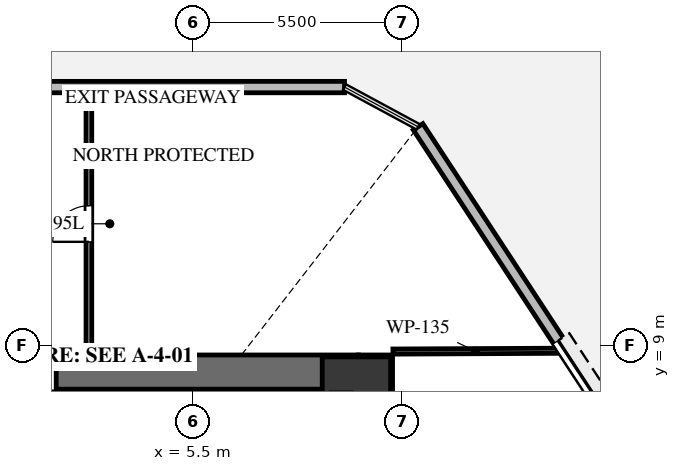
"""IFC4 building model, lengths in metres.
Left out: names, types, materials, properties, quantities, classifications, styles, units other than length and angle.
Written with IfcOpenShell. Run it as: python <this file> out.ifc"""

import sys

from ifc_helpers import new_model, si_unit, direction, frame, frame_2d, origin, origin_2d, place, context, subcontext, project, spatial, rectangle, extrude, source, transform, mapped, element, fill, save


model = new_model("IFC4")
c1 = context("Model", 3, precision=1e-05, world=origin(), true_north=direction((0.0, 1.0)))
c2 = subcontext(c1, "Body", "Model", "MODEL_VIEW")
j1 = project(units=[si_unit("LENGTHUNIT", "METRE"), si_unit("PLANEANGLEUNIT", "RADIAN")], contexts=[c1])
p1 = place(None, origin())
s1 = spatial("IfcSite", under=j1, at=p1, CompositionType="ELEMENT")
p2 = place(p1, origin())
s2 = spatial("IfcBuilding", under=s1, at=p2, CompositionType="ELEMENT")
p3 = place(p2, origin())
s3 = spatial("IfcBuildingStorey", under=s2, at=p3, CompositionType="ELEMENT", Elevation=0.0)
p4 = place(p3, frame((10.3, -0.15, 0.0), z_axis=(0.0, 0.0, 1.0), x_axis=(0.0, 1.0, 0.0)))
e1 = element("IfcWall", 1, at=p4, inside=s3, PredefinedType="SHEAR", context=c2, shape_type="SweptSolid", body=[
    extrude(rectangle(XDim=8.9, YDim=0.9, at=frame_2d((4.45, 0.0))), origin(), (0.0, 0.0, 1.0), 5.2),
])
p5 = place(p3, frame((1.9, 8.3, 0.0), z_axis=(0.0, 0.0, 1.0), x_axis=(1.0, 0.0, 0.0)))
e2 = element("IfcWall", 2, at=p5, inside=s3, PredefinedType="SHEAR", context=c2, shape_type="SweptSolid", body=[
    extrude(rectangle(XDim=7.95, YDim=0.9, at=frame_2d((3.975, 0.0))), origin(), (0.0, 0.0, 1.0), 5.2),
])
m1 = source(origin(), c2, "Body", "SweptSolid", [
    extrude(rectangle(XDim=1.8, YDim=1.8, at=origin_2d()), origin(), (0.0, 0.0, 1.0), 5.2),
])
p6 = place(p3, frame((9.8, 7.8, -0.3), z_axis=(0.0, 0.0, 1.0), x_axis=(1.0, 0.0, 0.0)))
e3 = element("IfcColumn", 3, at=p6, inside=s3, PredefinedType="COLUMN", context=c2, shape_type="MappedRepresentation", body=[
    mapped(m1, transform((0.0, 0.0, 0.0), x_axis=(1.0, 0.0, 0.0), y_axis=(0.0, 1.0, 0.0), z_axis=(0.0, 0.0, 1.0), scale=1.0)),
])
p7 = place(p3, frame((-8.579, 15.8, 0.0), z_axis=(0.0, 0.0, 1.0), x_axis=(1.0, 0.0, 0.0)))
e4 = element("IfcWall", 4, at=p7, inside=s3, PredefinedType="SOLIDWALL", context=c2, shape_type="SweptSolid", body=[
    extrude(rectangle(XDim=18.065, YDim=0.3, at=frame_2d((9.033, 0.0))), origin(), (0.0, 0.0, 1.0), 4.9),
])
p8 = place(p7, frame((8.033, 0.0, 0.0)))
e5 = element("IfcOpeningElement", 5, at=p8, cuts=e4, PredefinedType="OPENING", context=c2, shape_type="SweptSolid", body=[
    extrude(rectangle(XDim=2.0, YDim=2.3, at=frame_2d((1.0, 1.15))), frame((0.0, 0.16, 0.0), z_axis=(0.0, -1.0, 0.0), x_axis=(1.0, 0.0, 0.0)), (0.0, 0.0, 1.0), 0.32),
])
p9 = place(p3, frame((11.422, 14.754, 0.0), z_axis=(0.0, 0.0, 1.0), x_axis=(0.548298501614, -0.836282699288, 0.0)))
e6 = element("IfcWall", 6, at=p9, inside=s3, PredefinedType="SOLIDWALL", context=c2, shape_type="SweptSolid", body=[
    extrude(rectangle(XDim=16.853, YDim=0.3, at=frame_2d((8.426, 0.0))), origin(), (0.0, 0.0, 1.0), 4.9),
])
p10 = place(p9, frame((6.726, 0.0, 0.0)))
e7 = element("IfcOpeningElement", 7, at=p10, cuts=e6, PredefinedType="OPENING", context=c2, shape_type="SweptSolid", body=[
    extrude(rectangle(XDim=3.4, YDim=4.2, at=frame_2d((1.7, 2.1))), frame((0.0, 0.16, 0.0), z_axis=(0.0, -1.0, 0.0), x_axis=(1.0, 0.0, 0.0)), (0.0, 0.0, 1.0), 0.32),
])
p11 = place(p3, frame((2.76, 8.76, 0.0), z_axis=(0.0, 0.0, 1.0), x_axis=(0.0, 1.0, 0.0)))
e8 = element("IfcWall", 8, at=p11, inside=s3, PredefinedType="PARTITIONING", context=c2, shape_type="SweptSolid", body=[
    extrude(rectangle(XDim=6.885, YDim=0.15, at=frame_2d((3.442, 0.0))), origin(), (0.0, 0.0, 1.0), 4.885),
])
p12 = place(p11, frame((2.968, 0.0, 0.0)))
e9 = element("IfcOpeningElement", 9, at=p12, cuts=e8, PredefinedType="OPENING", context=c2, shape_type="SweptSolid", body=[
    extrude(rectangle(XDim=0.95, YDim=2.1, at=frame_2d((0.475, 1.05))), frame((0.0, 0.085, 0.0), z_axis=(0.0, -1.0, 0.0), x_axis=(1.0, 0.0, 0.0)), (0.0, 0.0, 1.0), 0.17),
])
p13 = place(p3, frame((10.76, 8.84, 0.0), z_axis=(0.0, 0.0, 1.0), x_axis=(0.999988301111, 0.004837110855, 0.0)))
e10 = element("IfcWall", 10, at=p13, inside=s3, PredefinedType="PARTITIONING", context=c2, shape_type="SweptSolid", body=[
    extrude(rectangle(XDim=4.341, YDim=0.135, at=frame_2d((2.17, 0.0))), origin(), (0.0, 0.0, 1.0), 4.885),
])
m2 = source(origin(), c2, "Body", "SweptSolid", [
    extrude(rectangle(XDim=3.4, YDim=4.2, at=frame_2d((1.7, 2.1))), frame((0.0, 0.025, 0.0), z_axis=(0.0, -1.0, 0.0), x_axis=(1.0, 0.0, 0.0)), (0.0, 0.0, 1.0), 0.05),
])
p14 = place(p10, origin())
e11 = element("IfcDoor", 11, at=p14, inside=s3, OperationType="ROLLINGUP", PredefinedType="GATE", context=c2, shape_type="MappedRepresentation", body=[
    mapped(m2, transform((0.0, 0.0, 0.0), x_axis=(1.0, 0.0, 0.0), y_axis=(0.0, 1.0, 0.0), z_axis=(0.0, 0.0, 1.0), scale=1.0)),
])
fill(e7, e11)
m3 = source(origin(), c2, "Body", "SweptSolid", [
    extrude(rectangle(XDim=0.95, YDim=2.1, at=frame_2d((0.475, 1.05))), frame((0.0, 0.025, 0.0), z_axis=(0.0, -1.0, 0.0), x_axis=(1.0, 0.0, 0.0)), (0.0, 0.0, 1.0), 0.05),
])
p15 = place(p12, origin())
e12 = element("IfcDoor", 12, at=p15, inside=s3, OperationType="SINGLE_SWING_LEFT", PredefinedType="DOOR", context=c2, shape_type="MappedRepresentation", body=[
    mapped(m3, transform((0.0, 0.0, 0.0), x_axis=(1.0, 0.0, 0.0), y_axis=(0.0, 1.0, 0.0), z_axis=(0.0, 0.0, 1.0), scale=1.0)),
])
fill(e9, e12)
save(model, sys.argv[1])
